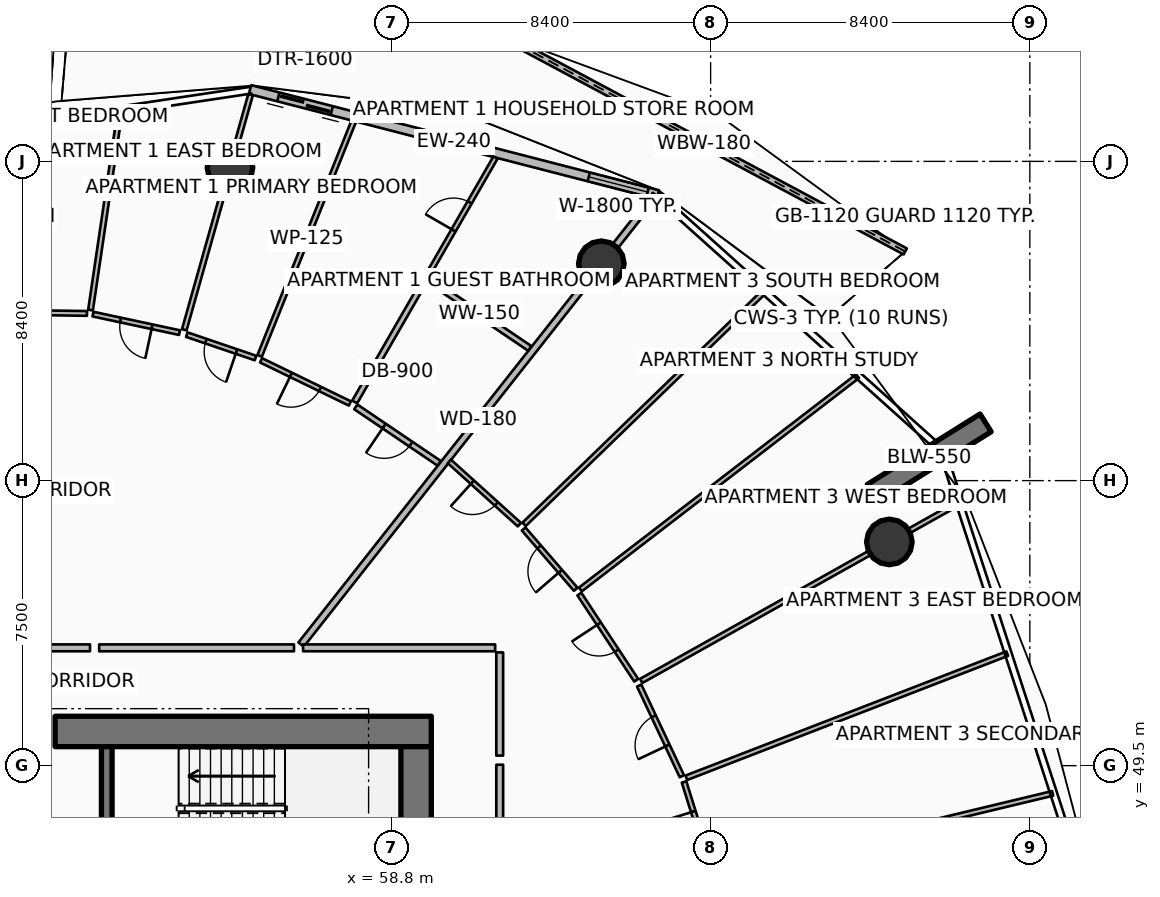
"""IFC4 building model, lengths in metres.
Left out: names, types, materials, properties, quantities, classifications, styles, units other than length and angle.
Written with IfcOpenShell. Run it as: python <this file> out.ifc"""

import sys

from ifc_helpers import new_model, si_unit, direction, frame, frame_2d, origin, origin_2d, place, context, subcontext, project, spatial, polyline, rectangle, circle, outline, extrude, element, fill, save


model = new_model("IFC4")
c1 = context("Model", 3, precision=1e-05, world=origin(), true_north=direction((0.0, 1.0)))
c2 = subcontext(c1, "Body", "Model", "MODEL_VIEW")
j1 = project(units=[si_unit("LENGTHUNIT", "METRE"), si_unit("PLANEANGLEUNIT", "RADIAN")], contexts=[c1])
p1 = place(None, origin())
s1 = spatial("IfcSite", under=j1, at=p1, CompositionType="ELEMENT")
p2 = place(p1, origin())
s2 = spatial("IfcBuilding", under=s1, at=p2, CompositionType="ELEMENT")
p3 = place(p2, frame((0.0, 0.0, 105.15)))
s3 = spatial("IfcBuildingStorey", under=s2, at=p3, CompositionType="ELEMENT", Elevation=105.15)
p4 = place(p3, frame((49.95, 50.4, 0.0), z_axis=(0.0, 0.0, 1.0), x_axis=(1.0, 0.0, 0.0)))
e1 = element("IfcWall", 1, at=p4, inside=s3, PredefinedType="SHEAR", context=c2, shape_type="SweptSolid", body=[
    extrude(rectangle(XDim=9.9, YDim=0.8, at=frame_2d((4.95, 0.0))), origin(), (0.0, 0.0, 1.0), 3.75),
])
p5 = place(p3, frame((59.45, 34.0, 0.0), z_axis=(0.0, 0.0, 1.0), x_axis=(0.0, 1.0, 0.0)))
e2 = element("IfcWall", 2, at=p5, inside=s3, PredefinedType="SHEAR", context=c2, shape_type="SweptSolid", body=[
    extrude(rectangle(XDim=16.0, YDim=0.8, at=frame_2d((8.0, 0.0))), origin(), (0.0, 0.0, 1.0), 3.75),
])
p6 = place(p3, frame((51.31, 46.5, 0.0), z_axis=(0.0, 0.0, 1.0), x_axis=(0.0, 1.0, 0.0)))
e3 = element("IfcWall", 3, at=p6, inside=s3, PredefinedType="SHEAR", context=c2, shape_type="SweptSolid", body=[
    extrude(rectangle(XDim=3.5, YDim=0.28, at=frame_2d((1.75, 0.0))), origin(), (0.0, 0.0, 1.0), 3.75),
])
p7 = place(p3, frame((71.469, 56.665, 0.0), z_axis=(0.0, 0.0, 1.0), x_axis=(0.848053161125, 0.529911158502, 0.0)))
e4 = element("IfcWall", 4, at=p7, inside=s3, PredefinedType="SOLIDWALL", context=c2, shape_type="SweptSolid", body=[
    extrude(rectangle(XDim=3.5, YDim=0.55, at=frame_2d((1.75, 0.0))), origin(), (0.0, 0.0, 1.0), 3.75),
])
for number, where, z_axis, x_axis in (
    (5, (71.903, 55.386, 0.0), (0.0, 0.0, 1.0), (1.0, 0.0, 0.0)),
    (6, (64.323, 62.706, 0.0), (0.0, 0.0, 1.0), (1.0, 0.0, 0.0)),
    (7, (54.553, 65.234, 0.0), (0.0, 0.0, 1.0), (1.0, 0.0, 0.0)),
):
    element("IfcColumn", number, at=place(p3, frame(where, z_axis=z_axis, x_axis=x_axis)), inside=s3, PredefinedType="COLUMN", context=c2, shape_type="SweptSolid", body=[
        extrude(circle(Radius=0.6, at=origin_2d()), origin(), (0.0, 0.0, 1.0), 3.5),
    ])
p8 = place(p3, frame((72.321, 63.03, 0.0), z_axis=(0.0, 0.0, 1.0), x_axis=(-0.881754939151, 0.471707777425, 0.0)))
e8 = element("IfcWall", 8, at=p8, inside=s3, PredefinedType="PARAPET", context=c2, shape_type="SweptSolid", body=[
    extrude(outline(polyline([(0.0, 0.0), (12.005, 0.0), (12.005, 1.632), (6.002, 1.798), (0.0, 1.86), (0.0, 0.0)])), frame((0.0, 0.09, 0.0), z_axis=(0.0, -1.0, 0.0), x_axis=(1.0, 0.0, 0.0)), (0.0, 0.0, 1.0), 0.18),
])
p9 = place(p3, frame((49.935, 68.672, 0.0), z_axis=(0.0, 0.0, 1.0), x_axis=(-0.966557844724, -0.25644869429, 0.0)))
e9 = element("IfcWall", 9, at=p9, inside=s3, PredefinedType="PARAPET", context=c2, shape_type="SweptSolid", body=[
    extrude(outline(polyline([(0.0, 0.0), (9.978, 0.0), (9.978, 1.148), (4.989, 1.127), (0.0, 1.224), (0.0, 0.0)])), frame((0.0, 0.09, 0.0), z_axis=(0.0, -1.0, 0.0), x_axis=(1.0, 0.0, 0.0)), (0.0, 0.0, 1.0), 0.18),
])
p10 = place(p3, frame((65.814, 64.523, 0.0), z_axis=(0.0, 0.0, 1.0), x_axis=(-0.968356180858, 0.249572248045, 0.0)))
e10 = element("IfcWall", 10, at=p10, inside=s3, PredefinedType="SOLIDWALL", context=c2, shape_type="SweptSolid", body=[
    extrude(rectangle(XDim=11.084, YDim=0.24, at=frame_2d((5.542, 0.0))), origin(), (0.0, 0.0, 1.0), 2.45),
])
p11 = place(p10, frame((8.865, 0.0, 0.0)))
e11 = element("IfcOpeningElement", 11, at=p11, cuts=e10, PredefinedType="OPENING", context=c2, shape_type="SweptSolid", body=[
    extrude(rectangle(XDim=1.45, YDim=2.15, at=frame_2d((0.725, 1.075))), frame((0.0, 0.13, 0.0), z_axis=(0.0, -1.0, 0.0), x_axis=(1.0, 0.0, 0.0)), (0.0, 0.0, 1.0), 0.26),
])
p12 = place(p10, frame((0.28, 0.0, 0.65)))
e12 = element("IfcOpeningElement", 12, at=p12, cuts=e10, PredefinedType="OPENING", context=c2, shape_type="SweptSolid", body=[
    extrude(rectangle(XDim=1.6, YDim=1.5, at=frame_2d((0.8, 0.75))), frame((0.0, 0.13, 0.0), z_axis=(0.0, -1.0, 0.0), x_axis=(1.0, 0.0, 0.0)), (0.0, 0.0, 1.0), 0.26),
])
p13 = place(p3, frame((56.425, 52.686, 0.0), z_axis=(0.0, 0.0, 1.0), x_axis=(0.619083417853, 0.785325233098, 0.0)))
e13 = element("IfcWall", 13, at=p13, inside=s3, PredefinedType="PARTITIONING", context=c2, shape_type="SweptSolid", body=[
    extrude(rectangle(XDim=15.063, YDim=0.18, at=frame_2d((7.532, 0.0))), origin(), (0.0, 0.0, 1.0), 2.94),
])
p14 = place(p3, frame((56.236, 52.6, 0.0), z_axis=(0.0, 0.0, 1.0), x_axis=(-1.0, 0.0, 0.0)))
e14 = element("IfcWall", 14, at=p14, inside=s3, PredefinedType="PARTITIONING", context=c2, shape_type="SweptSolid", body=[
    extrude(rectangle(XDim=5.127, YDim=0.18, at=frame_2d((2.563, 0.0))), origin(), (0.0, 0.0, 1.0), 2.94),
])
p15 = place(p3, frame((60.057, 57.455, 0.0), z_axis=(0.0, 0.0, 1.0), x_axis=(-0.828073269886, 0.560619888783, 0.0)))
e15 = element("IfcWall", 15, at=p15, inside=s3, PredefinedType="PARTITIONING", context=c2, shape_type="SweptSolid", body=[
    extrude(rectangle(XDim=2.649, YDim=0.15, at=frame_2d((1.324, 0.0))), origin(), (0.0, 0.0, 1.0), 2.94),
])
p16 = place(p15, frame((0.899, 0.0, 0.0)))
e16 = element("IfcOpeningElement", 16, at=p16, cuts=e15, PredefinedType="OPENING", context=c2, shape_type="SweptSolid", body=[
    extrude(rectangle(XDim=0.85, YDim=2.06, at=frame_2d((0.425, 1.03))), frame((0.0, 0.085, 0.0), z_axis=(0.0, -1.0, 0.0), x_axis=(1.0, 0.0, 0.0)), (0.0, 0.0, 1.0), 0.17),
])
p17 = place(p3, frame((62.44, 60.479, 0.0), z_axis=(0.0, 0.0, 1.0), x_axis=(-0.828057808374, 0.560642725798, 0.0)))
e17 = element("IfcWall", 17, at=p17, inside=s3, PredefinedType="PARTITIONING", context=c2, shape_type="SweptSolid", body=[
    extrude(rectangle(XDim=3.206, YDim=0.15, at=frame_2d((1.603, 0.0))), origin(), (0.0, 0.0, 1.0), 2.94),
])
p18 = place(p3, frame((57.834, 59.069, 0.0), z_axis=(0.0, 0.0, 1.0), x_axis=(0.49925269443, 0.866456431164, 0.0)))
e18 = element("IfcWall", 18, at=p18, inside=s3, PredefinedType="PARTITIONING", context=c2, shape_type="SweptSolid", body=[
    extrude(rectangle(XDim=3.72, YDim=0.15, at=frame_2d((1.86, 0.0))), origin(), (0.0, 0.0, 1.0), 2.94),
])
p19 = place(p3, frame((59.756, 62.405, 0.0), z_axis=(0.0, 0.0, 1.0), x_axis=(0.499189934721, 0.866492590316, 0.0)))
e19 = element("IfcWall", 19, at=p19, inside=s3, PredefinedType="PARTITIONING", context=c2, shape_type="SweptSolid", body=[
    extrude(rectangle(XDim=3.573, YDim=0.125, at=frame_2d((1.786, 0.0))), origin(), (0.0, 0.0, 1.0), 2.94),
])
p20 = place(p19, frame((1.361, 0.0, 0.0)))
e20 = element("IfcOpeningElement", 20, at=p20, cuts=e19, PredefinedType="OPENING", context=c2, shape_type="SweptSolid", body=[
    extrude(rectangle(XDim=0.85, YDim=2.06, at=frame_2d((0.425, 1.03))), frame((0.0, 0.073, 0.0), z_axis=(0.0, -1.0, 0.0), x_axis=(1.0, 0.0, 0.0)), (0.0, 0.0, 1.0), 0.145),
])
p21 = place(p3, frame((55.333, 60.283, 0.0), z_axis=(0.0, 0.0, 1.0), x_axis=(0.372282601369, 0.928119423737, 0.0)))
e21 = element("IfcWall", 21, at=p21, inside=s3, PredefinedType="PARTITIONING", context=c2, shape_type="SweptSolid", body=[
    extrude(rectangle(XDim=6.653, YDim=0.125, at=frame_2d((3.327, 0.0))), origin(), (0.0, 0.0, 1.0), 2.94),
])
p22 = place(p3, frame((57.708, 59.03, 0.0), z_axis=(0.0, 0.0, 1.0), x_axis=(-0.899555648673, 0.436806175484, 0.0)))
e22 = element("IfcWall", 22, at=p22, inside=s3, PredefinedType="PARTITIONING", context=c2, shape_type="SweptSolid", body=[
    extrude(rectangle(XDim=2.597, YDim=0.125, at=frame_2d((1.299, 0.0))), origin(), (0.0, 0.0, 1.0), 2.94),
])
p23 = place(p22, frame((0.874, 0.0, 0.0)))
e23 = element("IfcOpeningElement", 23, at=p23, cuts=e22, PredefinedType="OPENING", context=c2, shape_type="SweptSolid", body=[
    extrude(rectangle(XDim=0.85, YDim=2.06, at=frame_2d((0.425, 1.03))), frame((0.0, 0.073, 0.0), z_axis=(0.0, -1.0, 0.0), x_axis=(1.0, 0.0, 0.0)), (0.0, 0.0, 1.0), 0.145),
])
p24 = place(p3, frame((55.224, 60.226, 0.0), z_axis=(0.0, 0.0, 1.0), x_axis=(-0.946642431702, 0.322285752866, 0.0)))
e24 = element("IfcWall", 24, at=p24, inside=s3, PredefinedType="PARTITIONING", context=c2, shape_type="SweptSolid", body=[
    extrude(rectangle(XDim=1.908, YDim=0.125, at=frame_2d((0.954, 0.0))), origin(), (0.0, 0.0, 1.0), 2.94),
])
p25 = place(p24, frame((0.529, 0.0, 0.0)))
e25 = element("IfcOpeningElement", 25, at=p25, cuts=e24, PredefinedType="OPENING", context=c2, shape_type="SweptSolid", body=[
    extrude(rectangle(XDim=0.85, YDim=2.06, at=frame_2d((0.425, 1.03))), frame((0.0, 0.073, 0.0), z_axis=(0.0, -1.0, 0.0), x_axis=(1.0, 0.0, 0.0)), (0.0, 0.0, 1.0), 0.145),
])
p26 = place(p3, frame((50.869, 52.6, 0.0), z_axis=(0.0, 0.0, 1.0), x_axis=(-1.0, 0.0, 0.0)))
e26 = element("IfcWall", 26, at=p26, inside=s3, PredefinedType="PARTITIONING", context=c2, shape_type="SweptSolid", body=[
    extrude(rectangle(XDim=4.004, YDim=0.18, at=frame_2d((2.002, 0.0))), origin(), (0.0, 0.0, 1.0), 2.94),
])
p27 = place(p3, frame((53.35, 60.969, 0.0), z_axis=(0.0, 0.0, 1.0), x_axis=(0.271449341275, 0.962452728772, 0.0)))
e27 = element("IfcWall", 27, at=p27, inside=s3, PredefinedType="PARTITIONING", context=c2, shape_type="SweptSolid", body=[
    extrude(rectangle(XDim=6.429, YDim=0.125, at=frame_2d((3.214, 0.0))), origin(), (0.0, 0.0, 1.0), 2.94),
])
p28 = place(p3, frame((50.883, 61.487, 0.0), z_axis=(0.0, 0.0, 1.0), x_axis=(0.146319984384, 0.989237313373, 0.0)))
e28 = element("IfcWall", 28, at=p28, inside=s3, PredefinedType="PARTITIONING", context=c2, shape_type="SweptSolid", body=[
    extrude(rectangle(XDim=5.301, YDim=0.125, at=frame_2d((2.65, 0.0))), origin(), (0.0, 0.0, 1.0), 2.94),
])
p29 = place(p3, frame((53.225, 60.894, 0.0), z_axis=(0.0, 0.0, 1.0), x_axis=(-0.977859146171, 0.209264163799, 0.0)))
e29 = element("IfcWall", 29, at=p29, inside=s3, PredefinedType="PARTITIONING", context=c2, shape_type="SweptSolid", body=[
    extrude(rectangle(XDim=2.329, YDim=0.125, at=frame_2d((1.164, 0.0))), origin(), (0.0, 0.0, 1.0), 2.94),
])
p30 = place(p29, frame((0.739, 0.0, 0.0)))
e30 = element("IfcOpeningElement", 30, at=p30, cuts=e29, PredefinedType="OPENING", context=c2, shape_type="SweptSolid", body=[
    extrude(rectangle(XDim=0.85, YDim=2.06, at=frame_2d((0.425, 1.03))), frame((0.0, 0.073, 0.0), z_axis=(0.0, -1.0, 0.0), x_axis=(1.0, 0.0, 0.0)), (0.0, 0.0, 1.0), 0.145),
])
p31 = place(p3, frame((50.79, 61.399, 0.0), z_axis=(0.0, 0.0, 1.0), x_axis=(-0.999894626753, 0.014516727973, 0.0)))
e31 = element("IfcWall", 31, at=p31, inside=s3, PredefinedType="PARTITIONING", context=c2, shape_type="SweptSolid", body=[
    extrude(rectangle(XDim=4.995, YDim=0.125, at=frame_2d((2.498, 0.0))), origin(), (0.0, 0.0, 1.0), 2.94),
])
p32 = place(p31, frame((2.048, 0.0, 0.0)))
e32 = element("IfcOpeningElement", 32, at=p32, cuts=e31, PredefinedType="OPENING", context=c2, shape_type="SweptSolid", body=[
    extrude(rectangle(XDim=0.9, YDim=2.08, at=frame_2d((0.45, 1.04))), frame((0.0, 0.073, 0.0), z_axis=(0.0, -1.0, 0.0), x_axis=(1.0, 0.0, 0.0)), (0.0, 0.0, 1.0), 0.145),
])
p33 = place(p3, frame((61.65, 43.736, 0.0), z_axis=(0.0, 0.0, 1.0), x_axis=(0.0, 1.0, 0.0)))
e33 = element("IfcWall", 33, at=p33, inside=s3, PredefinedType="PARTITIONING", context=c2, shape_type="SweptSolid", body=[
    extrude(rectangle(XDim=5.789, YDim=0.18, at=frame_2d((2.895, 0.0))), origin(), (0.0, 0.0, 1.0), 2.94),
])
p34 = place(p3, frame((67.352, 46.646, 0.0), z_axis=(0.0, 0.0, 1.0), x_axis=(0.972370982899, 0.233440938173, 0.0)))
e34 = element("IfcWall", 34, at=p34, inside=s3, PredefinedType="PARTITIONING", context=c2, shape_type="SweptSolid", body=[
    extrude(rectangle(XDim=9.1, YDim=0.125, at=frame_2d((4.55, 0.0))), origin(), (0.0, 0.0, 1.0), 2.94),
])
p35 = place(p3, frame((66.561, 49.181, 0.0), z_axis=(0.0, 0.0, 1.0), x_axis=(0.932639821871, 0.360808761896, 0.0)))
e35 = element("IfcWall", 35, at=p35, inside=s3, PredefinedType="PARTITIONING", context=c2, shape_type="SweptSolid", body=[
    extrude(rectangle(XDim=9.054, YDim=0.125, at=frame_2d((4.527, 0.0))), origin(), (0.0, 0.0, 1.0), 2.94),
])
p36 = place(p3, frame((67.241, 46.701, 0.0), z_axis=(0.0, 0.0, 1.0), x_axis=(-0.297793530793, 0.954630301749, 0.0)))
e36 = element("IfcWall", 36, at=p36, inside=s3, PredefinedType="PARTITIONING", context=c2, shape_type="SweptSolid", body=[
    extrude(rectangle(XDim=2.483, YDim=0.125, at=frame_2d((1.242, 0.0))), origin(), (0.0, 0.0, 1.0), 2.94),
])
p37 = place(p36, frame((0.817, 0.0, 0.0)))
e37 = element("IfcOpeningElement", 37, at=p37, cuts=e36, PredefinedType="OPENING", context=c2, shape_type="SweptSolid", body=[
    extrude(rectangle(XDim=0.85, YDim=2.06, at=frame_2d((0.425, 1.03))), frame((0.0, 0.073, 0.0), z_axis=(0.0, -1.0, 0.0), x_axis=(1.0, 0.0, 0.0)), (0.0, 0.0, 1.0), 0.145),
])
p38 = place(p3, frame((66.443, 49.221, 0.0), z_axis=(0.0, 0.0, 1.0), x_axis=(-0.425730193436, 0.904850154665, 0.0)))
e38 = element("IfcWall", 38, at=p38, inside=s3, PredefinedType="PARTITIONING", context=c2, shape_type="SweptSolid", body=[
    extrude(rectangle(XDim=2.638, YDim=0.125, at=frame_2d((1.319, 0.0))), origin(), (0.0, 0.0, 1.0), 2.94),
])
p39 = place(p38, frame((0.894, 0.0, 0.0)))
e39 = element("IfcOpeningElement", 39, at=p39, cuts=e38, PredefinedType="OPENING", context=c2, shape_type="SweptSolid", body=[
    extrude(rectangle(XDim=0.85, YDim=2.06, at=frame_2d((0.425, 1.03))), frame((0.0, 0.073, 0.0), z_axis=(0.0, -1.0, 0.0), x_axis=(1.0, 0.0, 0.0)), (0.0, 0.0, 1.0), 0.145),
])
p40 = place(p3, frame((61.65, 49.764, 0.0), z_axis=(0.0, 0.0, 1.0), x_axis=(0.0, 1.0, 0.0)))
e40 = element("IfcWall", 40, at=p40, inside=s3, PredefinedType="PARTITIONING", context=c2, shape_type="SweptSolid", body=[
    extrude(rectangle(XDim=2.716, YDim=0.18, at=frame_2d((1.358, 0.0))), origin(), (0.0, 0.0, 1.0), 2.94),
])
p41 = place(p3, frame((61.53, 52.6, 0.0), z_axis=(0.0, 0.0, 1.0), x_axis=(-1.0, 0.0, 0.0)))
e41 = element("IfcWall", 41, at=p41, inside=s3, PredefinedType="PARTITIONING", context=c2, shape_type="SweptSolid", body=[
    extrude(rectangle(XDim=5.054, YDim=0.18, at=frame_2d((2.527, 0.0))), origin(), (0.0, 0.0, 1.0), 2.94),
])
p42 = place(p3, frame((65.373, 51.729, 0.0), z_axis=(0.0, 0.0, 1.0), x_axis=(0.872500794254, 0.488612693272, 0.0)))
e42 = element("IfcWall", 42, at=p42, inside=s3, PredefinedType="PARTITIONING", context=c2, shape_type="SweptSolid", body=[
    extrude(rectangle(XDim=9.568, YDim=0.125, at=frame_2d((4.784, 0.0))), origin(), (0.0, 0.0, 1.0), 2.94),
])
p43 = place(p3, frame((63.773, 54.136, 0.0), z_axis=(0.0, 0.0, 1.0), x_axis=(0.792546059912, 0.609812055405, 0.0)))
e43 = element("IfcWall", 43, at=p43, inside=s3, PredefinedType="PARTITIONING", context=c2, shape_type="SweptSolid", body=[
    extrude(rectangle(XDim=9.201, YDim=0.125, at=frame_2d((4.601, 0.0))), origin(), (0.0, 0.0, 1.0), 2.94),
])
p44 = place(p3, frame((62.292, 55.85, 0.0), z_axis=(0.0, 0.0, 1.0), x_axis=(0.718126885769, 0.695912189817, 0.0)))
e44 = element("IfcWall", 44, at=p44, inside=s3, PredefinedType="PARTITIONING", context=c2, shape_type="SweptSolid", body=[
    extrude(rectangle(XDim=8.781, YDim=0.125, at=frame_2d((4.391, 0.0))), origin(), (0.0, 0.0, 1.0), 2.94),
])
p45 = place(p3, frame((65.242, 51.747, 0.0), z_axis=(0.0, 0.0, 1.0), x_axis=(-0.550669378286, 0.834723448705, 0.0)))
e45 = element("IfcWall", 45, at=p45, inside=s3, PredefinedType="PARTITIONING", context=c2, shape_type="SweptSolid", body=[
    extrude(rectangle(XDim=2.716, YDim=0.125, at=frame_2d((1.358, 0.0))), origin(), (0.0, 0.0, 1.0), 2.94),
])
p46 = place(p45, frame((0.933, 0.0, 0.0)))
e46 = element("IfcOpeningElement", 46, at=p46, cuts=e45, PredefinedType="OPENING", context=c2, shape_type="SweptSolid", body=[
    extrude(rectangle(XDim=0.85, YDim=2.06, at=frame_2d((0.425, 1.03))), frame((0.0, 0.073, 0.0), z_axis=(0.0, -1.0, 0.0), x_axis=(1.0, 0.0, 0.0)), (0.0, 0.0, 1.0), 0.145),
])
p47 = place(p3, frame((63.65, 54.142, 0.0), z_axis=(0.0, 0.0, 1.0), x_axis=(-0.65397173696, 0.756518980104, 0.0)))
e47 = element("IfcWall", 47, at=p47, inside=s3, PredefinedType="PARTITIONING", context=c2, shape_type="SweptSolid", body=[
    extrude(rectangle(XDim=2.095, YDim=0.125, at=frame_2d((1.047, 0.0))), origin(), (0.0, 0.0, 1.0), 2.94),
])
p48 = place(p47, frame((0.623, 0.0, 0.0)))
e48 = element("IfcOpeningElement", 48, at=p48, cuts=e47, PredefinedType="OPENING", context=c2, shape_type="SweptSolid", body=[
    extrude(rectangle(XDim=0.85, YDim=2.06, at=frame_2d((0.425, 1.03))), frame((0.0, 0.073, 0.0), z_axis=(0.0, -1.0, 0.0), x_axis=(1.0, 0.0, 0.0)), (0.0, 0.0, 1.0), 0.145),
])
p49 = place(p3, frame((62.168, 55.841, 0.0), z_axis=(0.0, 0.0, 1.0), x_axis=(-0.742266682882, 0.67010459742, 0.0)))
e49 = element("IfcWall", 49, at=p49, inside=s3, PredefinedType="PARTITIONING", context=c2, shape_type="SweptSolid", body=[
    extrude(rectangle(XDim=2.483, YDim=0.125, at=frame_2d((1.242, 0.0))), origin(), (0.0, 0.0, 1.0), 2.94),
])
p50 = place(p49, frame((0.817, 0.0, 0.0)))
e50 = element("IfcOpeningElement", 50, at=p50, cuts=e49, PredefinedType="OPENING", context=c2, shape_type="SweptSolid", body=[
    extrude(rectangle(XDim=0.85, YDim=2.06, at=frame_2d((0.425, 1.03))), frame((0.0, 0.073, 0.0), z_axis=(0.0, -1.0, 0.0), x_axis=(1.0, 0.0, 0.0)), (0.0, 0.0, 1.0), 0.145),
])
p51 = place(p11, origin())
e51 = element("IfcDoor", 51, at=p51, inside=s3, OperationType="DOUBLE_DOOR_SLIDING", PredefinedType="DOOR", context=c2, shape_type="SweptSolid", body=[
    extrude(rectangle(XDim=1.45, YDim=2.15, at=frame_2d((0.725, 1.075))), frame((0.0, 0.025, 0.0), z_axis=(0.0, -1.0, 0.0), x_axis=(1.0, 0.0, 0.0)), (0.0, 0.0, 1.0), 0.05),
])
fill(e11, e51)
p52 = place(p12, origin())
e52 = element("IfcWindow", 52, at=p52, inside=s3, PartitioningType="SINGLE_PANEL", PredefinedType="WINDOW", context=c2, shape_type="SweptSolid", body=[
    extrude(rectangle(XDim=1.6, YDim=1.5, at=frame_2d((0.8, 0.75))), frame((0.0, 0.03, 0.0), z_axis=(0.0, -1.0, 0.0), x_axis=(1.0, 0.0, 0.0)), (0.0, 0.0, 1.0), 0.06),
])
fill(e12, e52)
p53 = place(p16, origin())
e53 = element("IfcDoor", 53, at=p53, inside=s3, OperationType="SINGLE_SWING_RIGHT", PredefinedType="DOOR", context=c2, shape_type="SweptSolid", body=[
    extrude(rectangle(XDim=0.85, YDim=2.06, at=frame_2d((0.425, 1.03))), frame((0.0, 0.025, 0.0), z_axis=(0.0, -1.0, 0.0), x_axis=(1.0, 0.0, 0.0)), (0.0, 0.0, 1.0), 0.05),
])
fill(e16, e53)
p54 = place(p20, origin())
e54 = element("IfcDoor", 54, at=p54, inside=s3, OperationType="SINGLE_SWING_LEFT", PredefinedType="DOOR", context=c2, shape_type="SweptSolid", body=[
    extrude(rectangle(XDim=0.85, YDim=2.06, at=frame_2d((0.425, 1.03))), frame((0.0, 0.025, 0.0), z_axis=(0.0, -1.0, 0.0), x_axis=(1.0, 0.0, 0.0)), (0.0, 0.0, 1.0), 0.05),
])
fill(e20, e54)
p55 = place(p23, origin())
e55 = element("IfcDoor", 55, at=p55, inside=s3, OperationType="SINGLE_SWING_RIGHT", PredefinedType="DOOR", context=c2, shape_type="SweptSolid", body=[
    extrude(rectangle(XDim=0.85, YDim=2.06, at=frame_2d((0.425, 1.03))), frame((0.0, 0.025, 0.0), z_axis=(0.0, -1.0, 0.0), x_axis=(1.0, 0.0, 0.0)), (0.0, 0.0, 1.0), 0.05),
])
fill(e23, e55)
p56 = place(p25, origin())
e56 = element("IfcDoor", 56, at=p56, inside=s3, OperationType="SINGLE_SWING_LEFT", PredefinedType="DOOR", context=c2, shape_type="SweptSolid", body=[
    extrude(rectangle(XDim=0.85, YDim=2.06, at=frame_2d((0.425, 1.03))), frame((0.0, 0.025, 0.0), z_axis=(0.0, -1.0, 0.0), x_axis=(1.0, 0.0, 0.0)), (0.0, 0.0, 1.0), 0.05),
])
fill(e25, e56)
p57 = place(p30, origin())
e57 = element("IfcDoor", 57, at=p57, inside=s3, OperationType="SINGLE_SWING_LEFT", PredefinedType="DOOR", context=c2, shape_type="SweptSolid", body=[
    extrude(rectangle(XDim=0.85, YDim=2.06, at=frame_2d((0.425, 1.03))), frame((0.0, 0.025, 0.0), z_axis=(0.0, -1.0, 0.0), x_axis=(1.0, 0.0, 0.0)), (0.0, 0.0, 1.0), 0.05),
])
fill(e30, e57)
p58 = place(p37, origin())
e58 = element("IfcDoor", 58, at=p58, inside=s3, OperationType="SINGLE_SWING_RIGHT", PredefinedType="DOOR", context=c2, shape_type="SweptSolid", body=[
    extrude(rectangle(XDim=0.85, YDim=2.06, at=frame_2d((0.425, 1.03))), frame((0.0, 0.025, 0.0), z_axis=(0.0, -1.0, 0.0), x_axis=(1.0, 0.0, 0.0)), (0.0, 0.0, 1.0), 0.05),
])
fill(e37, e58)
p59 = place(p39, origin())
e59 = element("IfcDoor", 59, at=p59, inside=s3, OperationType="SINGLE_SWING_LEFT", PredefinedType="DOOR", context=c2, shape_type="SweptSolid", body=[
    extrude(rectangle(XDim=0.85, YDim=2.06, at=frame_2d((0.425, 1.03))), frame((0.0, 0.025, 0.0), z_axis=(0.0, -1.0, 0.0), x_axis=(1.0, 0.0, 0.0)), (0.0, 0.0, 1.0), 0.05),
])
fill(e39, e59)
p60 = place(p46, origin())
e60 = element("IfcDoor", 60, at=p60, inside=s3, OperationType="SINGLE_SWING_RIGHT", PredefinedType="DOOR", context=c2, shape_type="SweptSolid", body=[
    extrude(rectangle(XDim=0.85, YDim=2.06, at=frame_2d((0.425, 1.03))), frame((0.0, 0.025, 0.0), z_axis=(0.0, -1.0, 0.0), x_axis=(1.0, 0.0, 0.0)), (0.0, 0.0, 1.0), 0.05),
])
fill(e46, e60)
p61 = place(p48, origin())
e61 = element("IfcDoor", 61, at=p61, inside=s3, OperationType="SINGLE_SWING_LEFT", PredefinedType="DOOR", context=c2, shape_type="SweptSolid", body=[
    extrude(rectangle(XDim=0.85, YDim=2.06, at=frame_2d((0.425, 1.03))), frame((0.0, 0.025, 0.0), z_axis=(0.0, -1.0, 0.0), x_axis=(1.0, 0.0, 0.0)), (0.0, 0.0, 1.0), 0.05),
])
fill(e48, e61)
p62 = place(p50, origin())
e62 = element("IfcDoor", 62, at=p62, inside=s3, OperationType="SINGLE_SWING_RIGHT", PredefinedType="DOOR", context=c2, shape_type="SweptSolid", body=[
    extrude(rectangle(XDim=0.85, YDim=2.06, at=frame_2d((0.425, 1.03))), frame((0.0, 0.025, 0.0), z_axis=(0.0, -1.0, 0.0), x_axis=(1.0, 0.0, 0.0)), (0.0, 0.0, 1.0), 0.05),
])
fill(e50, e62)
save(model, sys.argv[1])
